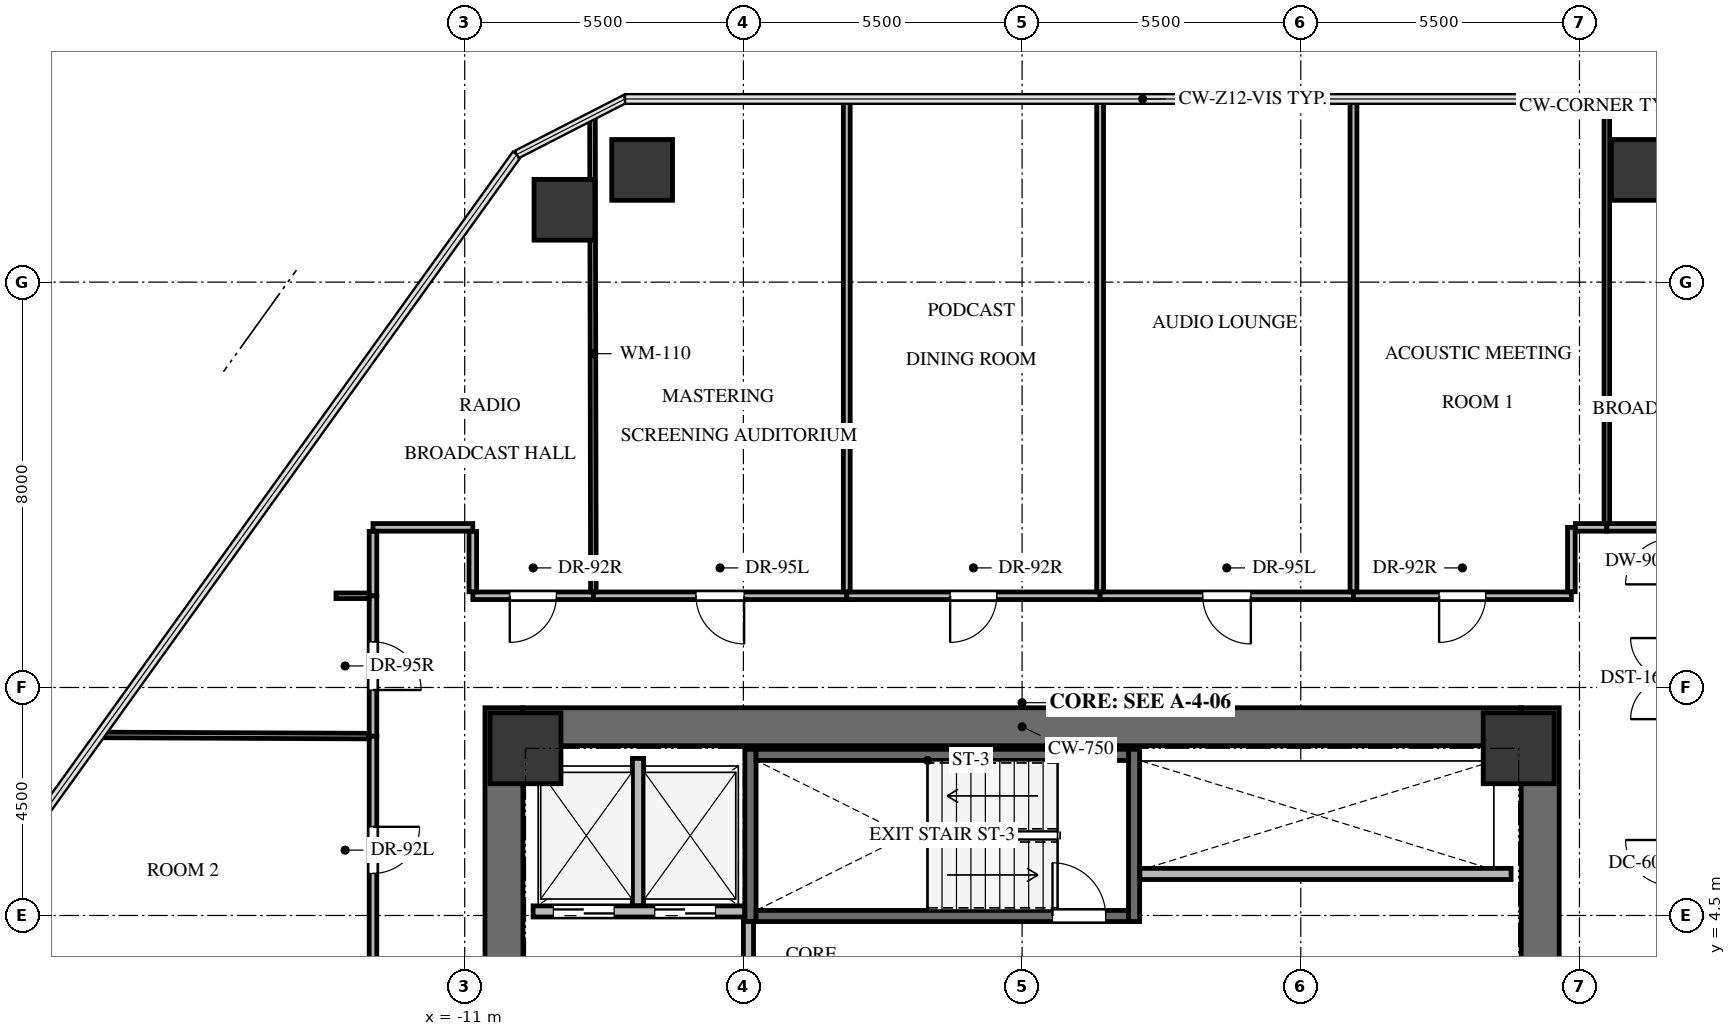
"""IFC4 building model, lengths in metres.
Left out: names, types, materials, properties, quantities, classifications, styles, units other than length and angle.
Written with IfcOpenShell. Run it as: python <this file> out.ifc"""

import sys

from ifc_helpers import new_model, si_unit, direction, frame, frame_2d, origin, origin_2d, place, context, subcontext, project, spatial, rectangle, extrude, source, transform, mapped, element, fill, save


model = new_model("IFC4")
c1 = context("Model", 3, precision=1e-05, world=origin(), true_north=direction((0.0, 1.0)))
c2 = subcontext(c1, "Body", "Model", "MODEL_VIEW")
j1 = project(units=[si_unit("LENGTHUNIT", "METRE"), si_unit("PLANEANGLEUNIT", "RADIAN")], contexts=[c1])
p1 = place(None, origin())
s1 = spatial("IfcSite", under=j1, at=p1, CompositionType="ELEMENT")
p2 = place(p1, origin())
s2 = spatial("IfcBuilding", under=s1, at=p2, CompositionType="ELEMENT")
p3 = place(p2, frame((0.0, 0.0, 127.2)))
s3 = spatial("IfcBuildingStorey", under=s2, at=p3, CompositionType="ELEMENT", Elevation=127.2)
for number, where, z_axis, x_axis in (
    (1, (-10.225, -8.6, 0.0), (0.0, 0.0, 1.0), (0.0, 1.0, 0.0)),
    (2, (10.225, -8.6, 0.0), (0.0, 0.0, 1.0), (0.0, 1.0, 0.0)),
):
    element("IfcWall", number, at=place(p3, frame(where, z_axis=z_axis, x_axis=x_axis)), inside=s3, PredefinedType="SHEAR", context=c2, shape_type="SweptSolid", body=[
        extrude(rectangle(XDim=17.2, YDim=0.75, at=frame_2d((8.6, 0.0))), origin(), (0.0, 0.0, 1.0), 3.3),
    ])
p4 = place(p3, frame((-9.85, 8.225, 0.0), z_axis=(0.0, 0.0, 1.0), x_axis=(1.0, 0.0, 0.0)))
e3 = element("IfcWall", 3, at=p4, inside=s3, PredefinedType="SHEAR", context=c2, shape_type="SweptSolid", body=[
    extrude(rectangle(XDim=19.7, YDim=0.75, at=frame_2d((9.85, 0.0))), origin(), (0.0, 0.0, 1.0), 3.3),
])
for number, where, z_axis, x_axis in (
    (4, (2.21, 4.38, -0.24), (0.0, 0.0, 1.0), (0.0, 1.0, 0.0)),
    (5, (-5.36, 7.78, -0.24), (0.0, 0.0, 1.0), (0.0, -1.0, 0.0)),
):
    element("IfcWall", number, at=place(p3, frame(where, z_axis=z_axis, x_axis=x_axis)), inside=s3, PredefinedType="SHEAR", context=c2, shape_type="SweptSolid", body=[
        extrude(rectangle(XDim=3.4, YDim=0.22, at=frame_2d((1.7, 0.0))), origin(), (0.0, 0.0, 1.0), 3.3),
    ])
p5 = place(p3, frame((-5.25, 4.49, -0.24), z_axis=(0.0, 0.0, 1.0), x_axis=(1.0, 0.0, 0.0)))
e6 = element("IfcWall", 6, at=p5, inside=s3, PredefinedType="SHEAR", context=c2, shape_type="SweptSolid", body=[
    extrude(rectangle(XDim=7.35, YDim=0.22, at=frame_2d((3.675, 0.0))), origin(), (0.0, 0.0, 1.0), 3.3),
])
p6 = place(p5, frame((5.85, 0.0, 0.0)))
e7 = element("IfcOpeningElement", 7, at=p6, cuts=e6, PredefinedType="OPENING", context=c2, shape_type="SweptSolid", body=[
    extrude(rectangle(XDim=1.05, YDim=2.15, at=frame_2d((0.525, 1.075))), frame((0.0, 0.12, 0.0), z_axis=(0.0, -1.0, 0.0), x_axis=(1.0, 0.0, 0.0)), (0.0, 0.0, 1.0), 0.24),
])
p7 = place(p3, frame((2.1, 7.67, -0.24), z_axis=(0.0, 0.0, 1.0), x_axis=(-1.0, 0.0, 0.0)))
e8 = element("IfcWall", 8, at=p7, inside=s3, PredefinedType="SHEAR", context=c2, shape_type="SweptSolid", body=[
    extrude(rectangle(XDim=7.35, YDim=0.22, at=frame_2d((3.675, 0.0))), origin(), (0.0, 0.0, 1.0), 3.3),
])
m1 = source(origin(), c2, "Body", "SweptSolid", [
    extrude(rectangle(XDim=1.4, YDim=1.4, at=origin_2d()), origin(), (0.0, 0.0, 1.0), 3.3),
])
for number, where, z_axis, x_axis in (
    (9, (9.8, 7.8, -0.24), (0.0, 0.0, 1.0), (1.0, 0.0, 0.0)),
    (10, (-9.8, 7.8, -0.24), (0.0, 0.0, 1.0), (1.0, 0.0, 0.0)),
):
    element("IfcColumn", number, at=place(p3, frame(where, z_axis=z_axis, x_axis=x_axis)), inside=s3, PredefinedType="COLUMN", context=c2, shape_type="MappedRepresentation", body=[
        mapped(m1, transform((0.0, 0.0, 0.0), x_axis=(1.0, 0.0, 0.0), y_axis=(0.0, 1.0, 0.0), z_axis=(0.0, 0.0, 1.0), scale=1.0)),
    ])
m2 = source(origin(), c2, "Body", "SweptSolid", [
    extrude(rectangle(XDim=1.2, YDim=1.2, at=origin_2d()), origin(), (0.0, 0.0, 1.0), 3.3),
])
for number, where, z_axis, x_axis in (
    (11, (-9.032, 18.428, -0.24), (0.0, 0.0, 1.0), (1.0, 0.0, 0.0)),
    (12, (-7.498, 19.215, -0.24), (0.0, 0.0, 1.0), (1.0, 0.0, 0.0)),
    (13, (12.23, 19.215, -0.24), (0.0, 0.0, 1.0), (1.0, 0.0, 0.0)),
):
    element("IfcColumn", number, at=place(p3, frame(where, z_axis=z_axis, x_axis=x_axis)), inside=s3, PredefinedType="COLUMN", context=c2, shape_type="MappedRepresentation", body=[
        mapped(m2, transform((0.0, 0.0, 0.0), x_axis=(1.0, 0.0, 0.0), y_axis=(0.0, 1.0, 0.0), z_axis=(0.0, 0.0, 1.0), scale=1.0)),
    ])
p8 = place(p3, frame((-9.65, 4.58, 0.0), z_axis=(0.0, 0.0, 1.0), x_axis=(1.0, 0.0, 0.0)))
e14 = element("IfcWall", 14, at=p8, inside=s3, PredefinedType="SOLIDWALL", context=c2, shape_type="SweptSolid", body=[
    extrude(rectangle(XDim=4.175, YDim=0.22, at=frame_2d((2.087, 0.0))), origin(), (0.0, 0.0, 1.0), 3.045),
])
p9 = place(p8, frame((0.4, 0.0, 0.0)))
e15 = element("IfcOpeningElement", 15, at=p9, cuts=e14, PredefinedType="OPENING", context=c2, shape_type="SweptSolid", body=[
    extrude(rectangle(XDim=1.2, YDim=2.15, at=frame_2d((0.6, 1.075))), frame((0.0, 0.12, 0.0), z_axis=(0.0, -1.0, 0.0), x_axis=(1.0, 0.0, 0.0)), (0.0, 0.0, 1.0), 0.24),
])
p10 = place(p8, frame((2.4, 0.0, 0.0)))
e16 = element("IfcOpeningElement", 16, at=p10, cuts=e14, PredefinedType="OPENING", context=c2, shape_type="SweptSolid", body=[
    extrude(rectangle(XDim=1.2, YDim=2.15, at=frame_2d((0.6, 1.075))), frame((0.0, 0.12, 0.0), z_axis=(0.0, -1.0, 0.0), x_axis=(1.0, 0.0, 0.0)), (0.0, 0.0, 1.0), 0.24),
])
p11 = place(p3, frame((-7.58, 4.694, 0.0), z_axis=(0.0, 0.0, 1.0), x_axis=(0.0, 1.0, 0.0)))
e17 = element("IfcWall", 17, at=p11, inside=s3, PredefinedType="SOLIDWALL", context=c2, shape_type="SweptSolid", body=[
    extrude(rectangle(XDim=2.906, YDim=0.22, at=frame_2d((1.453, 0.0))), origin(), (0.0, 0.0, 1.0), 3.045),
])
p12 = place(p3, frame((-5.4, 0.354, 0.0), z_axis=(0.0, 0.0, 1.0), x_axis=(0.0, 1.0, 0.0)))
e18 = element("IfcWall", 18, at=p12, inside=s3, PredefinedType="SOLIDWALL", context=c2, shape_type="SweptSolid", body=[
    extrude(rectangle(XDim=4.026, YDim=0.2, at=frame_2d((2.013, 0.0))), origin(), (0.0, 0.0, 1.0), 3.045),
])
p13 = place(p12, frame((0.246, 0.0, 0.0)))
e19 = element("IfcOpeningElement", 19, at=p13, cuts=e18, PredefinedType="OPENING", context=c2, shape_type="SweptSolid", body=[
    extrude(rectangle(XDim=1.0, YDim=2.15, at=frame_2d((0.5, 1.075))), frame((0.0, 0.11, 0.0), z_axis=(0.0, -1.0, 0.0), x_axis=(1.0, 0.0, 0.0)), (0.0, 0.0, 1.0), 0.22),
])
p14 = place(p3, frame((2.325, 5.32, 0.0), z_axis=(0.0, 0.0, 1.0), x_axis=(1.0, 0.0, 0.0)))
e20 = element("IfcWall", 20, at=p14, inside=s3, PredefinedType="SOLIDWALL", context=c2, shape_type="SweptSolid", body=[
    extrude(rectangle(XDim=7.325, YDim=0.22, at=frame_2d((3.663, 0.0))), origin(), (0.0, 0.0, 1.0), 3.045),
])
p15 = place(p3, frame((-8.46, 10.81, 0.0), z_axis=(0.0, 0.0, 1.0), x_axis=(-1.0, 0.0, 0.0)))
e21 = element("IfcWall", 21, at=p15, inside=s3, PredefinedType="PARTITIONING", context=c2, shape_type="SweptSolid", body=[
    extrude(rectangle(XDim=2.38, YDim=0.15, at=frame_2d((1.19, 0.0))), origin(), (0.0, 0.0, 1.0), 3.045),
])
p16 = place(p15, frame((0.73, 0.0, 0.0)))
e22 = element("IfcOpeningElement", 22, at=p16, cuts=e21, PredefinedType="OPENING", context=c2, shape_type="SweptSolid", body=[
    extrude(rectangle(XDim=0.92, YDim=2.1, at=frame_2d((0.46, 1.05))), frame((0.0, 0.085, 0.0), z_axis=(0.0, -1.0, 0.0), x_axis=(1.0, 0.0, 0.0)), (0.0, 0.0, 1.0), 0.17),
])
p17 = place(p3, frame((-10.84, 12.16, 0.0), z_axis=(0.0, 0.0, 1.0), x_axis=(-1.0, 0.0, 0.0)))
e23 = element("IfcWall", 23, at=p17, inside=s3, PredefinedType="PARTITIONING", context=c2, shape_type="SweptSolid", body=[
    extrude(rectangle(XDim=1.97, YDim=0.15, at=frame_2d((0.985, 0.0))), origin(), (0.0, 0.0, 1.0), 3.045),
])
p18 = place(p3, frame((-10.84, 10.889, 0.0), z_axis=(0.0, 0.0, 1.0), x_axis=(0.0, 1.0, 0.0)))
e24 = element("IfcWall", 24, at=p18, inside=s3, PredefinedType="PARTITIONING", context=c2, shape_type="SweptSolid", body=[
    extrude(rectangle(XDim=1.192, YDim=0.15, at=frame_2d((0.596, 0.0))), origin(), (0.0, 0.0, 1.0), 3.045),
])
p19 = place(p3, frame((-12.81, 12.081, 0.0), z_axis=(0.0, 0.0, 1.0), x_axis=(0.0, -1.0, 0.0)))
e25 = element("IfcWall", 25, at=p19, inside=s3, PredefinedType="PARTITIONING", context=c2, shape_type="SweptSolid", body=[
    extrude(rectangle(XDim=1.271, YDim=0.15, at=frame_2d((0.635, 0.0))), origin(), (0.0, 0.0, 1.0), 3.045),
])
p20 = place(p3, frame((-3.46, 10.81, 0.0), z_axis=(0.0, 0.0, 1.0), x_axis=(-1.0, 0.0, 0.0)))
e26 = element("IfcWall", 26, at=p20, inside=s3, PredefinedType="PARTITIONING", context=c2, shape_type="SweptSolid", body=[
    extrude(rectangle(XDim=5.0, YDim=0.15, at=frame_2d((2.5, 0.0))), origin(), (0.0, 0.0, 1.0), 2.212),
])
p21 = place(p20, frame((2.025, 0.0, 0.0)))
e27 = element("IfcOpeningElement", 27, at=p21, cuts=e26, PredefinedType="OPENING", context=c2, shape_type="SweptSolid", body=[
    extrude(rectangle(XDim=0.95, YDim=2.1, at=frame_2d((0.475, 1.05))), frame((0.0, 0.085, 0.0), z_axis=(0.0, -1.0, 0.0), x_axis=(1.0, 0.0, 0.0)), (0.0, 0.0, 1.0), 0.17),
])
p22 = place(p3, frame((1.54, 10.81, 0.0), z_axis=(0.0, 0.0, 1.0), x_axis=(-1.0, 0.0, 0.0)))
e28 = element("IfcWall", 28, at=p22, inside=s3, PredefinedType="PARTITIONING", context=c2, shape_type="SweptSolid", body=[
    extrude(rectangle(XDim=5.0, YDim=0.15, at=frame_2d((2.5, 0.0))), origin(), (0.0, 0.0, 1.0), 3.045),
])
p23 = place(p22, frame((2.04, 0.0, 0.0)))
e29 = element("IfcOpeningElement", 29, at=p23, cuts=e28, PredefinedType="OPENING", context=c2, shape_type="SweptSolid", body=[
    extrude(rectangle(XDim=0.92, YDim=2.1, at=frame_2d((0.46, 1.05))), frame((0.0, 0.085, 0.0), z_axis=(0.0, -1.0, 0.0), x_axis=(1.0, 0.0, 0.0)), (0.0, 0.0, 1.0), 0.17),
])
p24 = place(p3, frame((6.54, 10.81, 0.0), z_axis=(0.0, 0.0, 1.0), x_axis=(-1.0, 0.0, 0.0)))
e30 = element("IfcWall", 30, at=p24, inside=s3, PredefinedType="PARTITIONING", context=c2, shape_type="SweptSolid", body=[
    extrude(rectangle(XDim=5.0, YDim=0.15, at=frame_2d((2.5, 0.0))), origin(), (0.0, 0.0, 1.0), 2.608),
])
p25 = place(p24, frame((2.025, 0.0, 0.0)))
e31 = element("IfcOpeningElement", 31, at=p25, cuts=e30, PredefinedType="OPENING", context=c2, shape_type="SweptSolid", body=[
    extrude(rectangle(XDim=0.95, YDim=2.1, at=frame_2d((0.475, 1.05))), frame((0.0, 0.085, 0.0), z_axis=(0.0, -1.0, 0.0), x_axis=(1.0, 0.0, 0.0)), (0.0, 0.0, 1.0), 0.17),
])
p26 = place(p3, frame((10.84, 10.81, 0.0), z_axis=(0.0, 0.0, 1.0), x_axis=(-1.0, 0.0, 0.0)))
e32 = element("IfcWall", 32, at=p26, inside=s3, PredefinedType="PARTITIONING", context=c2, shape_type="SweptSolid", body=[
    extrude(rectangle(XDim=4.3, YDim=0.15, at=frame_2d((2.15, 0.0))), origin(), (0.0, 0.0, 1.0), 2.212),
])
p27 = place(p26, frame((1.69, 0.0, 0.0)))
e33 = element("IfcOpeningElement", 33, at=p27, cuts=e32, PredefinedType="OPENING", context=c2, shape_type="SweptSolid", body=[
    extrude(rectangle(XDim=0.92, YDim=2.1, at=frame_2d((0.46, 1.05))), frame((0.0, 0.085, 0.0), z_axis=(0.0, -1.0, 0.0), x_axis=(1.0, 0.0, 0.0)), (0.0, 0.0, 1.0), 0.17),
])
p28 = place(p3, frame((10.84, 12.16, 0.0), z_axis=(0.0, 0.0, 1.0), x_axis=(0.0, -1.0, 0.0)))
e34 = element("IfcWall", 34, at=p28, inside=s3, PredefinedType="PARTITIONING", context=c2, shape_type="SweptSolid", body=[
    extrude(rectangle(XDim=1.271, YDim=0.15, at=frame_2d((0.635, 0.0))), origin(), (0.0, 0.0, 1.0), 2.212),
])
p29 = place(p3, frame((11.54, 12.16, 0.0), z_axis=(0.0, 0.0, 1.0), x_axis=(-1.0, 0.0, 0.0)))
e35 = element("IfcWall", 35, at=p29, inside=s3, PredefinedType="PARTITIONING", context=c2, shape_type="SweptSolid", body=[
    extrude(rectangle(XDim=0.621, YDim=0.15, at=frame_2d((0.311, 0.0))), origin(), (0.0, 0.0, 1.0), 2.212),
])
p30 = place(p3, frame((12.731, 12.16, 0.0), z_axis=(0.0, 0.0, 1.0), x_axis=(-1.0, 0.0, 0.0)))
e36 = element("IfcWall", 36, at=p30, inside=s3, PredefinedType="PARTITIONING", context=c2, shape_type="SweptSolid", body=[
    extrude(rectangle(XDim=1.191, YDim=0.15, at=frame_2d((0.595, 0.0))), origin(), (0.0, 0.0, 1.0), 2.212),
])
p31 = place(p3, frame((-12.81, 8.04, 0.0), z_axis=(0.0, 0.0, 1.0), x_axis=(0.0, -1.0, 0.0)))
e37 = element("IfcWall", 37, at=p31, inside=s3, PredefinedType="PARTITIONING", context=c2, shape_type="SweptSolid", body=[
    extrude(rectangle(XDim=4.5, YDim=0.15, at=frame_2d((2.25, 0.0))), origin(), (0.0, 0.0, 1.0), 3.045),
])
p32 = place(p31, frame((1.79, 0.0, 0.0)))
e38 = element("IfcOpeningElement", 38, at=p32, cuts=e37, PredefinedType="OPENING", context=c2, shape_type="SweptSolid", body=[
    extrude(rectangle(XDim=0.92, YDim=2.1, at=frame_2d((0.46, 1.05))), frame((0.0, 0.085, 0.0), z_axis=(0.0, -1.0, 0.0), x_axis=(1.0, 0.0, 0.0)), (0.0, 0.0, 1.0), 0.17),
])
p33 = place(p3, frame((-12.81, 10.81, 0.0), z_axis=(0.0, 0.0, 1.0), x_axis=(0.0, -1.0, 0.0)))
e39 = element("IfcWall", 39, at=p33, inside=s3, PredefinedType="PARTITIONING", context=c2, shape_type="SweptSolid", body=[
    extrude(rectangle(XDim=2.77, YDim=0.15, at=frame_2d((1.385, 0.0))), origin(), (0.0, 0.0, 1.0), 3.045),
])
p34 = place(p33, frame((0.91, 0.0, 0.0)))
e40 = element("IfcOpeningElement", 40, at=p34, cuts=e39, PredefinedType="OPENING", context=c2, shape_type="SweptSolid", body=[
    extrude(rectangle(XDim=0.95, YDim=2.1, at=frame_2d((0.475, 1.05))), frame((0.0, 0.085, 0.0), z_axis=(0.0, -1.0, 0.0), x_axis=(1.0, 0.0, 0.0)), (0.0, 0.0, 1.0), 0.17),
])
p35 = place(p3, frame((-8.478, 20.286, 0.0), z_axis=(0.0, 0.0, 1.0), x_axis=(0.001922623691, -0.999998151757, 0.0)))
e41 = element("IfcWall", 41, at=p35, inside=s3, PredefinedType="MOVABLE", context=c2, shape_type="SweptSolid", body=[
    extrude(rectangle(XDim=9.397, YDim=0.11, at=frame_2d((4.698, 0.0))), origin(), (0.0, 0.0, 1.0), 2.212),
])
p36 = place(p3, frame((-12.889, 10.81, 0.0), z_axis=(0.0, 0.0, 1.0), x_axis=(-1.0, 0.0, 0.0)))
e42 = element("IfcWall", 42, at=p36, inside=s3, PredefinedType="MOVABLE", context=c2, shape_type="SweptSolid", body=[
    extrude(rectangle(XDim=0.651, YDim=0.11, at=frame_2d((0.326, 0.0))), origin(), (0.0, 0.0, 1.0), 3.045),
])
for number, where, z_axis, x_axis in (
    (43, (-3.46, 20.615, 0.0), (0.0, 0.0, 1.0), (0.0, -1.0, 0.0)),
    (44, (1.54, 20.615, 0.0), (0.0, 0.0, 1.0), (0.0, -1.0, 0.0)),
    (45, (6.54, 20.615, 0.0), (0.0, 0.0, 1.0), (0.0, -1.0, 0.0)),
):
    element("IfcWall", number, at=place(p3, frame(where, z_axis=z_axis, x_axis=x_axis)), inside=s3, PredefinedType="PARTITIONING", context=c2, shape_type="SweptSolid", body=[
        extrude(rectangle(XDim=9.726, YDim=0.135, at=frame_2d((4.863, 0.0))), origin(), (0.0, 0.0, 1.0), 2.38),
    ])
p37 = place(p3, frame((11.54, 20.615, 0.0), z_axis=(0.0, 0.0, 1.0), x_axis=(0.0, -1.0, 0.0)))
e46 = element("IfcWall", 46, at=p37, inside=s3, PredefinedType="MOVABLE", context=c2, shape_type="SweptSolid", body=[
    extrude(rectangle(XDim=8.376, YDim=0.11, at=frame_2d((4.188, 0.0))), origin(), (0.0, 0.0, 1.0), 2.212),
])
p38 = place(p3, frame((-18.202, 8.063, 0.0), z_axis=(0.0, 0.0, 1.0), x_axis=(0.999990671281, -0.004319415637, 0.0)))
e47 = element("IfcWall", 47, at=p38, inside=s3, PredefinedType="MOVABLE", context=c2, shape_type="SweptSolid", body=[
    extrude(rectangle(XDim=5.313, YDim=0.11, at=frame_2d((2.656, 0.0))), origin(), (0.0, 0.0, 1.0), 2.38),
])
m3 = source(origin(), c2, "Body", "SweptSolid", [
    extrude(rectangle(XDim=1.05, YDim=2.15, at=frame_2d((0.525, 1.075))), frame((0.0, 0.025, 0.0), z_axis=(0.0, -1.0, 0.0), x_axis=(1.0, 0.0, 0.0)), (0.0, 0.0, 1.0), 0.05),
])
p39 = place(p6, origin())
e48 = element("IfcDoor", 48, at=p39, inside=s3, OperationType="SINGLE_SWING_LEFT", PredefinedType="DOOR", context=c2, shape_type="MappedRepresentation", body=[
    mapped(m3, transform((0.0, 0.0, 0.0), x_axis=(1.0, 0.0, 0.0), y_axis=(0.0, 1.0, 0.0), z_axis=(0.0, 0.0, 1.0), scale=1.0)),
])
fill(e7, e48)
m4 = source(origin(), c2, "Body", "SweptSolid", [
    extrude(rectangle(XDim=1.2, YDim=2.15, at=frame_2d((0.6, 1.075))), frame((0.0, 0.025, 0.0), z_axis=(0.0, -1.0, 0.0), x_axis=(1.0, 0.0, 0.0)), (0.0, 0.0, 1.0), 0.05),
])
p40 = place(p9, origin())
e49 = element("IfcDoor", 49, at=p40, inside=s3, OperationType="DOUBLE_DOOR_SLIDING", PredefinedType="DOOR", context=c2, shape_type="MappedRepresentation", body=[
    mapped(m4, transform((0.0, 0.0, 0.0), x_axis=(1.0, 0.0, 0.0), y_axis=(0.0, 1.0, 0.0), z_axis=(0.0, 0.0, 1.0), scale=1.0)),
])
fill(e15, e49)
p41 = place(p10, origin())
e50 = element("IfcDoor", 50, at=p41, inside=s3, OperationType="DOUBLE_DOOR_SLIDING", PredefinedType="DOOR", context=c2, shape_type="MappedRepresentation", body=[
    mapped(m4, transform((0.0, 0.0, 0.0), x_axis=(1.0, 0.0, 0.0), y_axis=(0.0, 1.0, 0.0), z_axis=(0.0, 0.0, 1.0), scale=1.0)),
])
fill(e16, e50)
m5 = source(origin(), c2, "Body", "SweptSolid", [
    extrude(rectangle(XDim=0.92, YDim=2.1, at=frame_2d((0.46, 1.05))), frame((0.0, 0.025, 0.0), z_axis=(0.0, -1.0, 0.0), x_axis=(1.0, 0.0, 0.0)), (0.0, 0.0, 1.0), 0.05),
])
p42 = place(p16, origin())
e51 = element("IfcDoor", 51, at=p42, inside=s3, OperationType="SINGLE_SWING_RIGHT", PredefinedType="DOOR", context=c2, shape_type="MappedRepresentation", body=[
    mapped(m5, transform((0.0, 0.0, 0.0), x_axis=(1.0, 0.0, 0.0), y_axis=(0.0, 1.0, 0.0), z_axis=(0.0, 0.0, 1.0), scale=1.0)),
])
fill(e22, e51)
m6 = source(origin(), c2, "Body", "SweptSolid", [
    extrude(rectangle(XDim=0.95, YDim=2.1, at=frame_2d((0.475, 1.05))), frame((0.0, 0.025, 0.0), z_axis=(0.0, -1.0, 0.0), x_axis=(1.0, 0.0, 0.0)), (0.0, 0.0, 1.0), 0.05),
])
p43 = place(p21, origin())
e52 = element("IfcDoor", 52, at=p43, inside=s3, OperationType="SINGLE_SWING_LEFT", PredefinedType="DOOR", context=c2, shape_type="MappedRepresentation", body=[
    mapped(m6, transform((0.0, 0.0, 0.0), x_axis=(1.0, 0.0, 0.0), y_axis=(0.0, 1.0, 0.0), z_axis=(0.0, 0.0, 1.0), scale=1.0)),
])
fill(e27, e52)
p44 = place(p23, origin())
e53 = element("IfcDoor", 53, at=p44, inside=s3, OperationType="SINGLE_SWING_RIGHT", PredefinedType="DOOR", context=c2, shape_type="MappedRepresentation", body=[
    mapped(m5, transform((0.0, 0.0, 0.0), x_axis=(1.0, 0.0, 0.0), y_axis=(0.0, 1.0, 0.0), z_axis=(0.0, 0.0, 1.0), scale=1.0)),
])
fill(e29, e53)
p45 = place(p25, origin())
e54 = element("IfcDoor", 54, at=p45, inside=s3, OperationType="SINGLE_SWING_LEFT", PredefinedType="DOOR", context=c2, shape_type="MappedRepresentation", body=[
    mapped(m6, transform((0.0, 0.0, 0.0), x_axis=(1.0, 0.0, 0.0), y_axis=(0.0, 1.0, 0.0), z_axis=(0.0, 0.0, 1.0), scale=1.0)),
])
fill(e31, e54)
p46 = place(p27, origin())
e55 = element("IfcDoor", 55, at=p46, inside=s3, OperationType="SINGLE_SWING_RIGHT", PredefinedType="DOOR", context=c2, shape_type="MappedRepresentation", body=[
    mapped(m5, transform((0.0, 0.0, 0.0), x_axis=(1.0, 0.0, 0.0), y_axis=(0.0, 1.0, 0.0), z_axis=(0.0, 0.0, 1.0), scale=1.0)),
])
fill(e33, e55)
m7 = source(origin(), c2, "Body", "SweptSolid", [
    extrude(rectangle(XDim=0.92, YDim=2.1, at=frame_2d((0.46, 1.05))), frame((0.0, 0.025, 0.0), z_axis=(0.0, -1.0, 0.0), x_axis=(1.0, 0.0, 0.0)), (0.0, 0.0, 1.0), 0.05),
])
p47 = place(p32, origin())
e56 = element("IfcDoor", 56, at=p47, inside=s3, OperationType="SINGLE_SWING_LEFT", PredefinedType="DOOR", context=c2, shape_type="MappedRepresentation", body=[
    mapped(m7, transform((0.0, 0.0, 0.0), x_axis=(1.0, 0.0, 0.0), y_axis=(0.0, 1.0, 0.0), z_axis=(0.0, 0.0, 1.0), scale=1.0)),
])
fill(e38, e56)
m8 = source(origin(), c2, "Body", "SweptSolid", [
    extrude(rectangle(XDim=0.95, YDim=2.1, at=frame_2d((0.475, 1.05))), frame((0.0, 0.025, 0.0), z_axis=(0.0, -1.0, 0.0), x_axis=(1.0, 0.0, 0.0)), (0.0, 0.0, 1.0), 0.05),
])
p48 = place(p34, origin())
e57 = element("IfcDoor", 57, at=p48, inside=s3, OperationType="SINGLE_SWING_RIGHT", PredefinedType="DOOR", context=c2, shape_type="MappedRepresentation", body=[
    mapped(m8, transform((0.0, 0.0, 0.0), x_axis=(1.0, 0.0, 0.0), y_axis=(0.0, 1.0, 0.0), z_axis=(0.0, 0.0, 1.0), scale=1.0)),
])
fill(e40, e57)
save(model, sys.argv[1])
